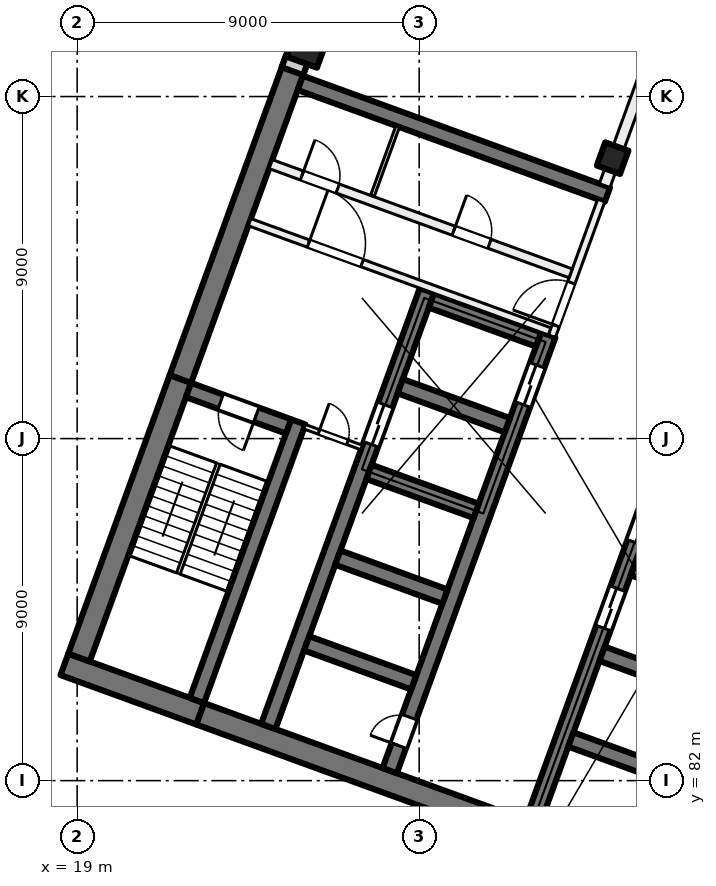
"""IFC4 building model, lengths in metres.
Left out: names, types, materials, properties, quantities, classifications, styles, units other than length and angle.
Written with IfcOpenShell. Run it as: python <this file> out.ifc"""

import sys

from ifc_helpers import new_model, si_unit, direction, frame, frame_2d, origin, origin_2d, place, context, subcontext, project, spatial, rectangle, extrude, element, fill, save


model = new_model("IFC4")
c1 = context("Model", 3, precision=1e-05, world=origin(), true_north=direction((0.0, 1.0)))
c2 = subcontext(c1, "Body", "Model", "MODEL_VIEW")
j1 = project(units=[si_unit("LENGTHUNIT", "METRE"), si_unit("PLANEANGLEUNIT", "RADIAN")], contexts=[c1])
p1 = place(None, origin())
s1 = spatial("IfcSite", under=j1, at=p1, CompositionType="ELEMENT")
p2 = place(p1, origin())
s2 = spatial("IfcBuilding", under=s1, at=p2, CompositionType="ELEMENT")
p3 = place(p2, frame((0.0, 0.0, 101.0)))
s3 = spatial("IfcBuildingStorey", under=s2, at=p3, CompositionType="ELEMENT", Elevation=101.0)
p4 = place(p3, frame((33.091, 98.379, 0.0), z_axis=(0.0, 0.0, 1.0), x_axis=(-0.342020143326, -0.939692620786, 0.0)))
e1 = element("IfcColumn", 1, at=p4, inside=s3, PredefinedType="COLUMN", context=c2, shape_type="SweptSolid", body=[
    extrude(rectangle(XDim=0.65, YDim=0.65, at=origin_2d()), origin(), (0.0, 0.0, 1.0), 4.0),
])
p5 = place(p3, frame((25.056, 101.303, 0.0), z_axis=(0.0, 0.0, 1.0), x_axis=(-0.342020143326, -0.939692620786, 0.0)))
e2 = element("IfcColumn", 2, at=p5, inside=s3, PredefinedType="COLUMN", context=c2, shape_type="SweptSolid", body=[
    extrude(rectangle(XDim=0.85, YDim=0.85, at=origin_2d()), origin(), (0.0, 0.0, 1.0), 4.0),
])
p6 = place(p3, frame((35.767, 78.835, 0.0), z_axis=(0.0, 0.0, 1.0), x_axis=(-0.939692894512, 0.342019391267, 0.0)))
e3 = element("IfcWall", 3, at=p6, inside=s3, PredefinedType="SHEAR", context=c2, shape_type="SweptSolid", body=[
    extrude(rectangle(XDim=14.4, YDim=0.6, at=frame_2d((7.2, 0.0))), origin(), (0.0, 0.0, 1.0), 4.0),
])
p7 = place(p3, frame((22.236, 83.76, 0.0), z_axis=(0.0, 0.0, 1.0), x_axis=(-0.939680822529, 0.342052557032, 0.0)))
e4 = element("IfcWall", 4, at=p7, inside=s3, PredefinedType="SHEAR", context=c2, shape_type="SweptSolid", body=[
    extrude(rectangle(XDim=3.8, YDim=0.6, at=frame_2d((1.9, 0.0))), origin(), (0.0, 0.0, 1.0), 4.0),
])
p8 = place(p3, frame((19.05, 85.239, 0.0), z_axis=(0.0, 0.0, 1.0), x_axis=(0.342016982193, 0.939693771338, 0.0)))
e5 = element("IfcWall", 5, at=p8, inside=s3, PredefinedType="SHEAR", context=c2, shape_type="SweptSolid", body=[
    extrude(rectangle(XDim=7.8, YDim=0.6, at=frame_2d((3.9, 0.0))), origin(), (0.0, 0.0, 1.0), 4.0),
])
p9 = place(p3, frame((21.717, 92.568, 0.0), z_axis=(0.0, 0.0, 1.0), x_axis=(0.342017595281, 0.939693548195, 0.0)))
e6 = element("IfcWall", 6, at=p9, inside=s3, PredefinedType="SHEAR", context=c2, shape_type="SweptSolid", body=[
    extrude(rectangle(XDim=8.925, YDim=0.6, at=frame_2d((4.462, 0.0))), origin(), (0.0, 0.0, 1.0), 4.0),
])
p10 = place(p3, frame((22.15, 84.11, 0.0), z_axis=(0.0, 0.0, 1.0), x_axis=(0.342016982193, 0.939693771338, 0.0)))
e7 = element("IfcWall", 7, at=p10, inside=s3, PredefinedType="SHEAR", context=c2, shape_type="SweptSolid", body=[
    extrude(rectangle(XDim=7.8, YDim=0.4, at=frame_2d((3.9, 0.0))), origin(), (0.0, 0.0, 1.0), 4.0),
])
p11 = place(p3, frame((24.562, 91.32, 0.0), z_axis=(0.0, 0.0, 1.0), x_axis=(-0.939717030584, 0.341953070509, 0.0)))
e8 = element("IfcWall", 8, at=p11, inside=s3, PredefinedType="SHEAR", context=c2, shape_type="SweptSolid", body=[
    extrude(rectangle(XDim=2.8, YDim=0.4, at=frame_2d((1.4, 0.0))), origin(), (0.0, 0.0, 1.0), 4.0),
])
p12 = place(p11, frame((0.9, 0.0, 0.0)))
e9 = element("IfcOpeningElement", 9, at=p12, cuts=e8, PredefinedType="OPENING", context=c2, shape_type="SweptSolid", body=[
    extrude(rectangle(XDim=1.0, YDim=2.1, at=frame_2d((0.5, 1.05))), frame((0.0, 0.21, 0.0), z_axis=(0.0, -1.0, 0.0), x_axis=(1.0, 0.0, 0.0)), (0.0, 0.0, 1.0), 0.42),
])
p13 = place(p3, frame((30.984, 80.895, 0.0), z_axis=(0.0, 0.0, 1.0), x_axis=(0.342021021735, 0.939692301071, 0.0)))
e10 = element("IfcWall", 10, at=p13, inside=s3, PredefinedType="SHEAR", context=c2, shape_type="SweptSolid", body=[
    extrude(rectangle(XDim=12.2, YDim=0.4, at=frame_2d((6.1, 0.0))), origin(), (0.0, 0.0, 1.0), 4.0),
])
p14 = place(p13, frame((5.45, 0.0, 0.0)))
e11 = element("IfcOpeningElement", 11, at=p14, cuts=e10, PredefinedType="OPENING", context=c2, shape_type="SweptSolid", body=[
    extrude(rectangle(XDim=1.1, YDim=2.1, at=frame_2d((0.55, 1.05))), frame((0.0, 0.21, 0.0), z_axis=(0.0, -1.0, 0.0), x_axis=(1.0, 0.0, 0.0)), (0.0, 0.0, 1.0), 0.42),
])
p15 = place(p13, frame((7.85, 0.0, 0.0)))
e12 = element("IfcOpeningElement", 12, at=p15, cuts=e10, PredefinedType="OPENING", context=c2, shape_type="SweptSolid", body=[
    extrude(rectangle(XDim=1.1, YDim=2.1, at=frame_2d((0.55, 1.05))), frame((0.0, 0.21, 0.0), z_axis=(0.0, -1.0, 0.0), x_axis=(1.0, 0.0, 0.0)), (0.0, 0.0, 1.0), 0.42),
])
p16 = place(p13, frame((10.25, 0.0, 0.0)))
e13 = element("IfcOpeningElement", 13, at=p16, cuts=e10, PredefinedType="OPENING", context=c2, shape_type="SweptSolid", body=[
    extrude(rectangle(XDim=1.1, YDim=2.1, at=frame_2d((0.55, 1.05))), frame((0.0, 0.21, 0.0), z_axis=(0.0, -1.0, 0.0), x_axis=(1.0, 0.0, 0.0)), (0.0, 0.0, 1.0), 0.42),
])
for number, where, z_axis, x_axis in (
    (14, (34.812, 82.056, 0.0), (0.0, 0.0, 1.0), (-0.94, 0.342, 0.0)),
    (15, (35.632, 84.311, 0.0), (0.0, 0.0, 1.0), (-0.94, 0.342, 0.0)),
    (16, (36.453, 86.566, 0.0), (0.0, 0.0, 1.0), (-0.94, 0.342, 0.0)),
):
    element("IfcWall", number, at=place(p3, frame(where, z_axis=z_axis, x_axis=x_axis)), inside=s3, PredefinedType="SHEAR", context=c2, shape_type="SweptSolid", body=[
        extrude(rectangle(XDim=3.0, YDim=0.4, at=frame_2d((1.5, 0.0))), origin(), (0.0, 0.0, 1.0), 4.0),
    ])
p17 = place(p3, frame((27.225, 82.263, 0.0), z_axis=(0.0, 0.0, 1.0), x_axis=(0.342014590177, 0.939694641948, 0.0)))
e17 = element("IfcWall", 17, at=p17, inside=s3, PredefinedType="SHEAR", context=c2, shape_type="SweptSolid", body=[
    extrude(rectangle(XDim=12.2, YDim=0.4, at=frame_2d((6.1, 0.0))), origin(), (0.0, 0.0, 1.0), 4.0),
])
p18 = place(p17, frame((10.25, 0.0, 0.0)))
e18 = element("IfcOpeningElement", 18, at=p18, cuts=e17, PredefinedType="OPENING", context=c2, shape_type="SweptSolid", body=[
    extrude(rectangle(XDim=1.1, YDim=2.1, at=frame_2d((0.55, 1.05))), frame((0.0, 0.21, 0.0), z_axis=(0.0, -1.0, 0.0), x_axis=(1.0, 0.0, 0.0)), (0.0, 0.0, 1.0), 0.42),
])
p19 = place(p17, frame((0.7, 0.0, 0.0)))
e19 = element("IfcOpeningElement", 19, at=p19, cuts=e17, PredefinedType="OPENING", context=c2, shape_type="SweptSolid", body=[
    extrude(rectangle(XDim=0.8, YDim=2.1, at=frame_2d((0.4, 1.05))), frame((0.0, 0.21, 0.0), z_axis=(0.0, -1.0, 0.0), x_axis=(1.0, 0.0, 0.0)), (0.0, 0.0, 1.0), 0.42),
])
p20 = place(p3, frame((24.03, 83.426, 0.0), z_axis=(0.0, 0.0, 1.0), x_axis=(0.342014590177, 0.939694641948, 0.0)))
e20 = element("IfcWall", 20, at=p20, inside=s3, PredefinedType="SHEAR", context=c2, shape_type="SweptSolid", body=[
    extrude(rectangle(XDim=12.2, YDim=0.4, at=frame_2d((6.1, 0.0))), origin(), (0.0, 0.0, 1.0), 4.0),
])
p21 = place(p20, frame((7.9, 0.0, 0.0)))
e21 = element("IfcOpeningElement", 21, at=p21, cuts=e20, PredefinedType="OPENING", context=c2, shape_type="SweptSolid", body=[
    extrude(rectangle(XDim=1.1, YDim=2.1, at=frame_2d((0.55, 1.05))), frame((0.0, 0.21, 0.0), z_axis=(0.0, -1.0, 0.0), x_axis=(1.0, 0.0, 0.0)), (0.0, 0.0, 1.0), 0.42),
])
p22 = place(p3, frame((27.858, 84.587, 0.0), z_axis=(0.0, 0.0, 1.0), x_axis=(-0.939686455819, 0.342037080957, 0.0)))
e22 = element("IfcWall", 22, at=p22, inside=s3, PredefinedType="SHEAR", context=c2, shape_type="SweptSolid", body=[
    extrude(rectangle(XDim=3.0, YDim=0.4, at=frame_2d((1.5, 0.0))), origin(), (0.0, 0.0, 1.0), 4.0),
])
p23 = place(p3, frame((28.678, 86.842, 0.0), z_axis=(0.0, 0.0, 1.0), x_axis=(-0.939676934218, 0.342063238742, 0.0)))
e23 = element("IfcWall", 23, at=p23, inside=s3, PredefinedType="SHEAR", context=c2, shape_type="SweptSolid", body=[
    extrude(rectangle(XDim=3.0, YDim=0.4, at=frame_2d((1.5, 0.0))), origin(), (0.0, 0.0, 1.0), 4.0),
])
for number, where, z_axis, x_axis in (
    (24, (29.5, 89.097, 0.0), (0.0, 0.0, 1.0), (-0.94, 0.342, 0.0)),
    (25, (30.32, 91.353, 0.0), (0.0, 0.0, 1.0), (-0.94, 0.342, 0.0)),
    (26, (31.141, 93.608, 0.0), (0.0, 0.0, 1.0), (-0.94, 0.342, 0.0)),
):
    element("IfcWall", number, at=place(p3, frame(where, z_axis=z_axis, x_axis=x_axis)), inside=s3, PredefinedType="SHEAR", context=c2, shape_type="SweptSolid", body=[
        extrude(rectangle(XDim=3.0, YDim=0.4, at=frame_2d((1.5, 0.0))), origin(), (0.0, 0.0, 1.0), 4.0),
    ])
p24 = place(p3, frame((32.953, 97.418, 0.0), z_axis=(0.0, 0.0, 1.0), x_axis=(-0.93969060187, 0.342025690201, 0.0)))
e27 = element("IfcWall", 27, at=p24, inside=s3, PredefinedType="SHEAR", context=c2, shape_type="SweptSolid", body=[
    extrude(rectangle(XDim=8.6, YDim=0.4, at=frame_2d((4.3, 0.0))), origin(), (0.0, 0.0, 1.0), 4.0),
])
p25 = place(p3, frame((24.666, 100.669, 0.0), z_axis=(0.0, 0.0, 1.0), x_axis=(0.34201964167, 0.939692803373, 0.0)))
e28 = element("IfcWall", 28, at=p25, inside=s3, PredefinedType="SOLIDWALL", context=c2, shape_type="SweptSolid", body=[
    extrude(rectangle(XDim=32.884, YDim=0.6, at=frame_2d((16.442, 0.0))), origin(), (0.0, 0.0, 1.0), 3.625),
])
p26 = place(p25, frame((1.48, 0.0, 0.9)))
e29 = element("IfcOpeningElement", 29, at=p26, cuts=e28, PredefinedType="OPENING", context=c2, shape_type="SweptSolid", body=[
    extrude(rectangle(XDim=3.0, YDim=2.4, at=frame_2d((1.5, 1.2))), frame((0.0, 0.31, 0.0), z_axis=(0.0, -1.0, 0.0), x_axis=(1.0, 0.0, 0.0)), (0.0, 0.0, 1.0), 0.62),
])
p27 = place(p25, frame((5.98, 0.0, 0.9)))
e30 = element("IfcOpeningElement", 30, at=p27, cuts=e28, PredefinedType="OPENING", context=c2, shape_type="SweptSolid", body=[
    extrude(rectangle(XDim=3.0, YDim=2.4, at=frame_2d((1.5, 1.2))), frame((0.0, 0.31, 0.0), z_axis=(0.0, -1.0, 0.0), x_axis=(1.0, 0.0, 0.0)), (0.0, 0.0, 1.0), 0.62),
])
p28 = place(p25, frame((10.48, 0.0, 0.9)))
e31 = element("IfcOpeningElement", 31, at=p28, cuts=e28, PredefinedType="OPENING", context=c2, shape_type="SweptSolid", body=[
    extrude(rectangle(XDim=3.0, YDim=2.4, at=frame_2d((1.5, 1.2))), frame((0.0, 0.31, 0.0), z_axis=(0.0, -1.0, 0.0), x_axis=(1.0, 0.0, 0.0)), (0.0, 0.0, 1.0), 0.62),
])
p29 = place(p25, frame((14.98, 0.0, 0.9)))
e32 = element("IfcOpeningElement", 32, at=p29, cuts=e28, PredefinedType="OPENING", context=c2, shape_type="SweptSolid", body=[
    extrude(rectangle(XDim=3.0, YDim=2.4, at=frame_2d((1.5, 1.2))), frame((0.0, 0.31, 0.0), z_axis=(0.0, -1.0, 0.0), x_axis=(1.0, 0.0, 0.0)), (0.0, 0.0, 1.0), 0.62),
])
p30 = place(p25, frame((19.48, 0.0, 0.9)))
e33 = element("IfcOpeningElement", 33, at=p30, cuts=e28, PredefinedType="OPENING", context=c2, shape_type="SweptSolid", body=[
    extrude(rectangle(XDim=3.0, YDim=2.4, at=frame_2d((1.5, 1.2))), frame((0.0, 0.31, 0.0), z_axis=(0.0, -1.0, 0.0), x_axis=(1.0, 0.0, 0.0)), (0.0, 0.0, 1.0), 0.62),
])
p31 = place(p25, frame((23.98, 0.0, 0.9)))
e34 = element("IfcOpeningElement", 34, at=p31, cuts=e28, PredefinedType="OPENING", context=c2, shape_type="SweptSolid", body=[
    extrude(rectangle(XDim=3.0, YDim=2.4, at=frame_2d((1.5, 1.2))), frame((0.0, 0.31, 0.0), z_axis=(0.0, -1.0, 0.0), x_axis=(1.0, 0.0, 0.0)), (0.0, 0.0, 1.0), 0.62),
])
p32 = place(p25, frame((28.48, 0.0, 0.9)))
e35 = element("IfcOpeningElement", 35, at=p32, cuts=e28, PredefinedType="OPENING", context=c2, shape_type="SweptSolid", body=[
    extrude(rectangle(XDim=3.0, YDim=2.4, at=frame_2d((1.5, 1.2))), frame((0.0, 0.31, 0.0), z_axis=(0.0, -1.0, 0.0), x_axis=(1.0, 0.0, 0.0)), (0.0, 0.0, 1.0), 0.62),
])
p33 = place(p3, frame((31.491, 93.693, 0.0), z_axis=(0.0, 0.0, 1.0), x_axis=(0.341995824804, 0.939701471648, 0.0)))
e36 = element("IfcWall", 36, at=p33, inside=s3, PredefinedType="PARTITIONING", context=c2, shape_type="SweptSolid", body=[
    extrude(rectangle(XDim=3.8, YDim=0.2, at=frame_2d((1.9, 0.0))), origin(), (0.0, 0.0, 1.0), 3.625),
])
p34 = place(p33, frame((0.3, 0.0, 0.0)))
e37 = element("IfcOpeningElement", 37, at=p34, cuts=e36, PredefinedType="OPENING", context=c2, shape_type="SweptSolid", body=[
    extrude(rectangle(XDim=1.2, YDim=2.1, at=frame_2d((0.6, 1.05))), frame((0.0, 0.11, 0.0), z_axis=(0.0, -1.0, 0.0), x_axis=(1.0, 0.0, 0.0)), (0.0, 0.0, 1.0), 0.22),
])
p35 = place(p3, frame((23.538, 96.694, 0.0), z_axis=(0.0, 0.0, 1.0), x_axis=(0.939691552312, -0.342023078919, 0.0)))
e38 = element("IfcWall", 38, at=p35, inside=s3, PredefinedType="PARTITIONING", context=c2, shape_type="SweptSolid", body=[
    extrude(rectangle(XDim=8.4, YDim=0.2, at=frame_2d((4.2, 0.0))), origin(), (0.0, 0.0, 1.0), 3.625),
])
p36 = place(p35, frame((1.65, 0.0, 0.0)))
e39 = element("IfcOpeningElement", 39, at=p36, cuts=e38, PredefinedType="OPENING", context=c2, shape_type="SweptSolid", body=[
    extrude(rectangle(XDim=1.5, YDim=2.1, at=frame_2d((0.75, 1.05))), frame((0.0, 0.11, 0.0), z_axis=(0.0, -1.0, 0.0), x_axis=(1.0, 0.0, 0.0)), (0.0, 0.0, 1.0), 0.22),
])
p37 = place(p3, frame((24.094, 98.221, 0.0), z_axis=(0.0, 0.0, 1.0), x_axis=(0.939691552312, -0.342023078919, 0.0)))
e40 = element("IfcWall", 40, at=p37, inside=s3, PredefinedType="PARTITIONING", context=c2, shape_type="SweptSolid", body=[
    extrude(rectangle(XDim=8.4, YDim=0.25, at=frame_2d((4.2, 0.0))), origin(), (0.0, 0.0, 1.0), 3.625),
])
p38 = place(p37, frame((5.125, 0.0, 0.0)))
e41 = element("IfcOpeningElement", 41, at=p38, cuts=e40, PredefinedType="OPENING", context=c2, shape_type="SweptSolid", body=[
    extrude(rectangle(XDim=1.0, YDim=2.1, at=frame_2d((0.5, 1.05))), frame((0.0, 0.135, 0.0), z_axis=(0.0, -1.0, 0.0), x_axis=(1.0, 0.0, 0.0)), (0.0, 0.0, 1.0), 0.27),
])
p39 = place(p37, frame((0.875, 0.0, 0.0)))
e42 = element("IfcOpeningElement", 42, at=p39, cuts=e40, PredefinedType="OPENING", context=c2, shape_type="SweptSolid", body=[
    extrude(rectangle(XDim=1.0, YDim=2.1, at=frame_2d((0.5, 1.05))), frame((0.0, 0.135, 0.0), z_axis=(0.0, -1.0, 0.0), x_axis=(1.0, 0.0, 0.0)), (0.0, 0.0, 1.0), 0.27),
])
p40 = place(p3, frame((24.985, 91.312, 0.0), z_axis=(0.0, 0.0, 1.0), x_axis=(0.939708740826, -0.341975850632, 0.0)))
e43 = element("IfcWall", 43, at=p40, inside=s3, PredefinedType="PARTITIONING", context=c2, shape_type="SweptSolid", body=[
    extrude(rectangle(XDim=1.6, YDim=0.125, at=frame_2d((0.8, 0.0))), origin(), (0.0, 0.0, 1.0), 3.625),
])
p41 = place(p40, frame((0.4, 0.0, 0.0)))
e44 = element("IfcOpeningElement", 44, at=p41, cuts=e43, PredefinedType="OPENING", context=c2, shape_type="SweptSolid", body=[
    extrude(rectangle(XDim=0.8, YDim=2.1, at=frame_2d((0.4, 1.05))), frame((0.0, 0.073, 0.0), z_axis=(0.0, -1.0, 0.0), x_axis=(1.0, 0.0, 0.0)), (0.0, 0.0, 1.0), 0.145),
])
p42 = place(p3, frame((26.768, 97.381, 0.0), z_axis=(0.0, 0.0, 1.0), x_axis=(0.342024501273, 0.939691034611, 0.0)))
e45 = element("IfcWall", 45, at=p42, inside=s3, PredefinedType="PARTITIONING", context=c2, shape_type="SweptSolid", body=[
    extrude(rectangle(XDim=1.95, YDim=0.1, at=frame_2d((0.975, 0.0))), origin(), (0.0, 0.0, 1.0), 3.625),
])
p43 = place(p3, frame((32.881, 97.657, 0.0), z_axis=(0.0, 0.0, 1.0), x_axis=(0.342017360004, 0.939693633828, 0.0)))
e46 = element("IfcWall", 46, at=p43, inside=s3, PredefinedType="PARTITIONING", context=c2, shape_type="SweptSolid", body=[
    extrude(rectangle(XDim=34.516, YDim=0.3, at=frame_2d((17.258, 0.0))), origin(), (0.0, 0.0, 1.0), 3.625),
])
p44 = place(p43, frame((7.475, 0.0, 0.0)))
e47 = element("IfcOpeningElement", 47, at=p44, cuts=e46, PredefinedType="OPENING", context=c2, shape_type="SweptSolid", body=[
    extrude(rectangle(XDim=1.8, YDim=2.1, at=frame_2d((0.9, 1.05))), frame((0.0, 0.16, 0.0), z_axis=(0.0, -1.0, 0.0), x_axis=(1.0, 0.0, 0.0)), (0.0, 0.0, 1.0), 0.32),
])
p45 = place(p43, frame((25.0, 0.0, 0.0)))
e48 = element("IfcOpeningElement", 48, at=p45, cuts=e46, PredefinedType="OPENING", context=c2, shape_type="SweptSolid", body=[
    extrude(rectangle(XDim=1.0, YDim=2.1, at=frame_2d((0.5, 1.05))), frame((0.0, 0.16, 0.0), z_axis=(0.0, -1.0, 0.0), x_axis=(1.0, 0.0, 0.0)), (0.0, 0.0, 1.0), 0.32),
])
p46 = place(p43, frame((29.779, 0.0, 0.0)))
e49 = element("IfcOpeningElement", 49, at=p46, cuts=e46, PredefinedType="OPENING", context=c2, shape_type="SweptSolid", body=[
    extrude(rectangle(XDim=1.8, YDim=2.1, at=frame_2d((0.9, 1.05))), frame((0.0, 0.16, 0.0), z_axis=(0.0, -1.0, 0.0), x_axis=(1.0, 0.0, 0.0)), (0.0, 0.0, 1.0), 0.32),
])
p47 = place(p18, origin())
e50 = element("IfcDoor", 50, at=p47, inside=s3, OperationType="DOUBLE_DOOR_SLIDING", PredefinedType="DOOR", context=c2, shape_type="SweptSolid", body=[
    extrude(rectangle(XDim=1.1, YDim=2.1, at=frame_2d((0.55, 1.05))), frame((0.0, 0.025, 0.0), z_axis=(0.0, -1.0, 0.0), x_axis=(1.0, 0.0, 0.0)), (0.0, 0.0, 1.0), 0.05),
])
fill(e18, e50)
p48 = place(p14, origin())
e51 = element("IfcDoor", 51, at=p48, inside=s3, OperationType="DOUBLE_DOOR_SLIDING", PredefinedType="DOOR", context=c2, shape_type="SweptSolid", body=[
    extrude(rectangle(XDim=1.1, YDim=2.1, at=frame_2d((0.55, 1.05))), frame((0.0, 0.025, 0.0), z_axis=(0.0, -1.0, 0.0), x_axis=(1.0, 0.0, 0.0)), (0.0, 0.0, 1.0), 0.05),
])
fill(e11, e51)
p49 = place(p15, origin())
e52 = element("IfcDoor", 52, at=p49, inside=s3, OperationType="DOUBLE_DOOR_SLIDING", PredefinedType="DOOR", context=c2, shape_type="SweptSolid", body=[
    extrude(rectangle(XDim=1.1, YDim=2.1, at=frame_2d((0.55, 1.05))), frame((0.0, 0.025, 0.0), z_axis=(0.0, -1.0, 0.0), x_axis=(1.0, 0.0, 0.0)), (0.0, 0.0, 1.0), 0.05),
])
fill(e12, e52)
p50 = place(p19, origin())
e53 = element("IfcDoor", 53, at=p50, inside=s3, OperationType="SINGLE_SWING_LEFT", PredefinedType="DOOR", context=c2, shape_type="SweptSolid", body=[
    extrude(rectangle(XDim=0.8, YDim=2.1, at=frame_2d((0.4, 1.05))), frame((0.0, 0.025, 0.0), z_axis=(0.0, -1.0, 0.0), x_axis=(1.0, 0.0, 0.0)), (0.0, 0.0, 1.0), 0.05),
])
fill(e19, e53)
p51 = place(p34, origin())
e54 = element("IfcDoor", 54, at=p51, inside=s3, OperationType="DOUBLE_DOOR_SINGLE_SWING", PredefinedType="DOOR", context=c2, shape_type="SweptSolid", body=[
    extrude(rectangle(XDim=1.2, YDim=2.1, at=frame_2d((0.6, 1.05))), frame((0.0, 0.025, 0.0), z_axis=(0.0, -1.0, 0.0), x_axis=(1.0, 0.0, 0.0)), (0.0, 0.0, 1.0), 0.05),
])
fill(e37, e54)
p52 = place(p36, origin())
e55 = element("IfcDoor", 55, at=p52, inside=s3, OperationType="DOUBLE_DOOR_SINGLE_SWING", PredefinedType="DOOR", context=c2, shape_type="SweptSolid", body=[
    extrude(rectangle(XDim=1.5, YDim=2.1, at=frame_2d((0.75, 1.05))), frame((0.0, 0.025, 0.0), z_axis=(0.0, -1.0, 0.0), x_axis=(1.0, 0.0, 0.0)), (0.0, 0.0, 1.0), 0.05),
])
fill(e39, e55)
p53 = place(p12, origin())
e56 = element("IfcDoor", 56, at=p53, inside=s3, OperationType="SINGLE_SWING_LEFT", PredefinedType="DOOR", context=c2, shape_type="SweptSolid", body=[
    extrude(rectangle(XDim=1.0, YDim=2.1, at=frame_2d((0.5, 1.05))), frame((0.0, 0.025, 0.0), z_axis=(0.0, -1.0, 0.0), x_axis=(1.0, 0.0, 0.0)), (0.0, 0.0, 1.0), 0.05),
])
fill(e9, e56)
p54 = place(p41, origin())
e57 = element("IfcDoor", 57, at=p54, inside=s3, OperationType="SINGLE_SWING_RIGHT", PredefinedType="DOOR", context=c2, shape_type="SweptSolid", body=[
    extrude(rectangle(XDim=0.8, YDim=2.1, at=frame_2d((0.4, 1.05))), frame((0.0, 0.025, 0.0), z_axis=(0.0, -1.0, 0.0), x_axis=(1.0, 0.0, 0.0)), (0.0, 0.0, 1.0), 0.05),
])
fill(e44, e57)
p55 = place(p38, origin())
e58 = element("IfcDoor", 58, at=p55, inside=s3, OperationType="SINGLE_SWING_LEFT", PredefinedType="DOOR", context=c2, shape_type="SweptSolid", body=[
    extrude(rectangle(XDim=1.0, YDim=2.1, at=frame_2d((0.5, 1.05))), frame((0.0, 0.025, 0.0), z_axis=(0.0, -1.0, 0.0), x_axis=(1.0, 0.0, 0.0)), (0.0, 0.0, 1.0), 0.05),
])
fill(e41, e58)
p56 = place(p39, origin())
e59 = element("IfcDoor", 59, at=p56, inside=s3, OperationType="SINGLE_SWING_RIGHT", PredefinedType="DOOR", context=c2, shape_type="SweptSolid", body=[
    extrude(rectangle(XDim=1.0, YDim=2.1, at=frame_2d((0.5, 1.05))), frame((0.0, 0.025, 0.0), z_axis=(0.0, -1.0, 0.0), x_axis=(1.0, 0.0, 0.0)), (0.0, 0.0, 1.0), 0.05),
])
fill(e42, e59)
p57 = place(p21, origin())
e60 = element("IfcDoor", 60, at=p57, inside=s3, OperationType="DOUBLE_DOOR_SLIDING", PredefinedType="DOOR", context=c2, shape_type="SweptSolid", body=[
    extrude(rectangle(XDim=1.1, YDim=2.1, at=frame_2d((0.55, 1.05))), frame((0.0, 0.025, 0.0), z_axis=(0.0, -1.0, 0.0), x_axis=(1.0, 0.0, 0.0)), (0.0, 0.0, 1.0), 0.05),
])
fill(e21, e60)
save(model, sys.argv[1])
